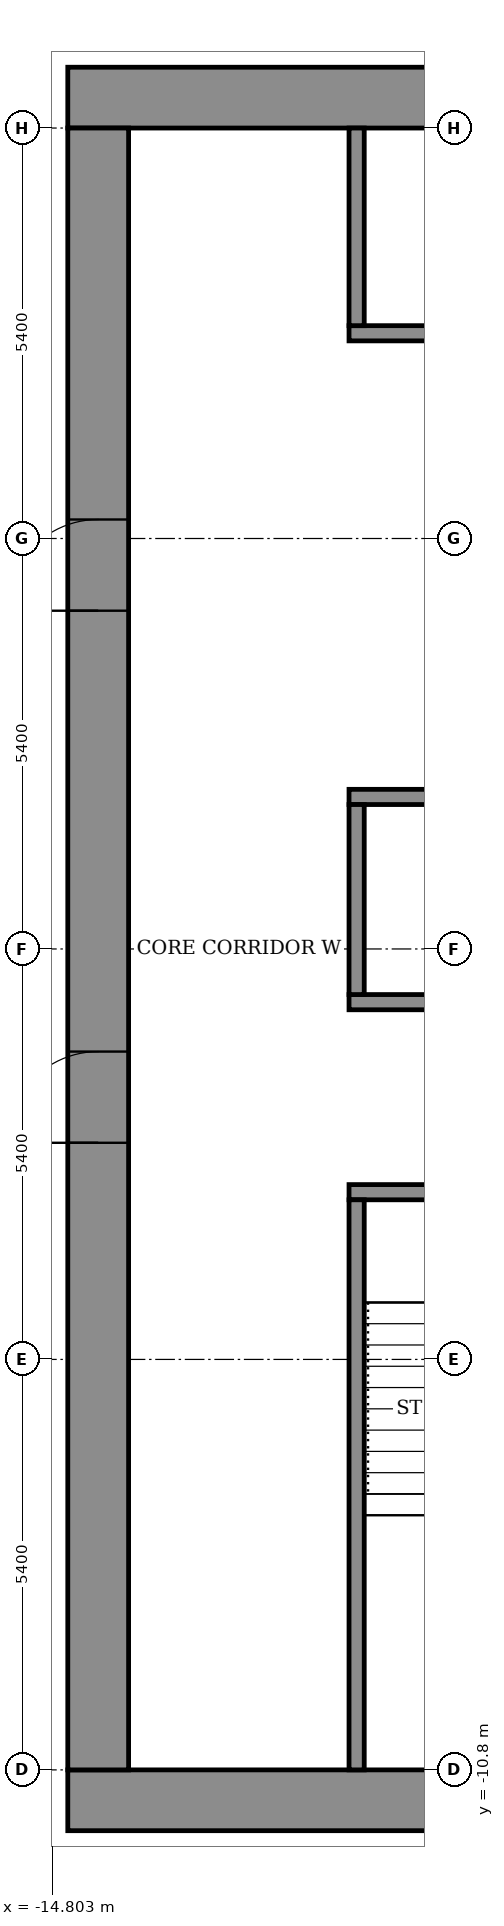
"""IFC4 building model, lengths in metres.
Left out: names, types, materials, properties, quantities, classifications, styles, units other than length and angle.
Written with IfcOpenShell. Run it as: python <this file> out.ifc"""

import sys

from ifc_helpers import new_model, si_unit, direction, frame, frame_2d, origin, place, context, subcontext, project, spatial, rectangle, extrude, element, fill, save


model = new_model("IFC4")
c1 = context("Model", 3, precision=1e-05, world=origin(), true_north=direction((0.0, 1.0)))
c2 = subcontext(c1, "Body", "Model", "MODEL_VIEW")
j1 = project(units=[si_unit("LENGTHUNIT", "METRE"), si_unit("PLANEANGLEUNIT", "RADIAN")], contexts=[c1])
p1 = place(None, origin())
s1 = spatial("IfcSite", under=j1, at=p1, CompositionType="ELEMENT")
p2 = place(p1, origin())
s2 = spatial("IfcBuilding", under=s1, at=p2, CompositionType="ELEMENT")
p3 = place(p2, frame((0.0, 0.0, 208.7)))
s3 = spatial("IfcBuildingStorey", under=s2, at=p3, CompositionType="ELEMENT", Elevation=208.7)
for number, where, z_axis, x_axis in (
    (1, (-14.6, -11.2, 0.0), (0.0, 0.0, 1.0), (1.0, 0.0, 0.0)),
    (2, (-14.6, 11.2, 0.0), (0.0, 0.0, 1.0), (1.0, 0.0, 0.0)),
):
    element("IfcWall", number, at=place(p3, frame(where, z_axis=z_axis, x_axis=x_axis)), inside=s3, PredefinedType="SHEAR", context=c2, shape_type="SweptSolid", body=[
        extrude(rectangle(XDim=29.2, YDim=0.8, at=frame_2d((14.6, 0.0))), origin(), (0.0, 0.0, 1.0), 3.6),
    ])
p4 = place(p3, frame((-14.2, -10.8, 0.0), z_axis=(0.0, 0.0, 1.0), x_axis=(0.0, 1.0, 0.0)))
e3 = element("IfcWall", 3, at=p4, inside=s3, PredefinedType="SHEAR", context=c2, shape_type="SweptSolid", body=[
    extrude(rectangle(XDim=21.6, YDim=0.8, at=frame_2d((10.8, 0.0))), origin(), (0.0, 0.0, 1.0), 3.6),
])
p5 = place(p4, frame((8.25, 0.0, 0.0)))
e4 = element("IfcOpeningElement", 4, at=p5, cuts=e3, PredefinedType="OPENING", context=c2, shape_type="SweptSolid", body=[
    extrude(rectangle(XDim=1.2, YDim=2.1, at=frame_2d((0.6, 1.05))), frame((0.0, 0.41, 0.0), z_axis=(0.0, -1.0, 0.0), x_axis=(1.0, 0.0, 0.0)), (0.0, 0.0, 1.0), 0.82),
])
p6 = place(p4, frame((15.25, 0.0, 0.0)))
e5 = element("IfcOpeningElement", 5, at=p6, cuts=e3, PredefinedType="OPENING", context=c2, shape_type="SweptSolid", body=[
    extrude(rectangle(XDim=1.2, YDim=2.1, at=frame_2d((0.6, 1.05))), frame((0.0, 0.41, 0.0), z_axis=(0.0, -1.0, 0.0), x_axis=(1.0, 0.0, 0.0)), (0.0, 0.0, 1.0), 0.82),
])
p7 = place(p3, frame((-10.9, -3.2, 0.0), z_axis=(0.0, 0.0, 1.0), x_axis=(1.0, 0.0, 0.0)))
e6 = element("IfcWall", 6, at=p7, inside=s3, PredefinedType="SHEAR", context=c2, shape_type="SweptSolid", body=[
    extrude(rectangle(XDim=21.8, YDim=0.2, at=frame_2d((10.9, 0.0))), origin(), (0.0, 0.0, 1.0), 3.05),
])
p8 = place(p7, frame((1.075, 0.0, 0.0)))
e7 = element("IfcOpeningElement", 7, at=p8, cuts=e6, PredefinedType="OPENING", context=c2, shape_type="SweptSolid", body=[
    extrude(rectangle(XDim=1.1, YDim=2.1, at=frame_2d((0.55, 1.05))), frame((0.0, 0.11, 0.0), z_axis=(0.0, -1.0, 0.0), x_axis=(1.0, 0.0, 0.0)), (0.0, 0.0, 1.0), 0.22),
])
p9 = place(p7, frame((10.325, 0.0, 0.0)))
e8 = element("IfcOpeningElement", 8, at=p9, cuts=e6, PredefinedType="OPENING", context=c2, shape_type="SweptSolid", body=[
    extrude(rectangle(XDim=1.1, YDim=2.1, at=frame_2d((0.55, 1.05))), frame((0.0, 0.11, 0.0), z_axis=(0.0, -1.0, 0.0), x_axis=(1.0, 0.0, 0.0)), (0.0, 0.0, 1.0), 0.22),
])
p10 = place(p7, frame((19.625, 0.0, 0.0)))
e9 = element("IfcOpeningElement", 9, at=p10, cuts=e6, PredefinedType="OPENING", context=c2, shape_type="SweptSolid", body=[
    extrude(rectangle(XDim=1.1, YDim=2.1, at=frame_2d((0.55, 1.05))), frame((0.0, 0.11, 0.0), z_axis=(0.0, -1.0, 0.0), x_axis=(1.0, 0.0, 0.0)), (0.0, 0.0, 1.0), 0.22),
])
p11 = place(p7, frame((5.7, 0.0, 0.0)))
e10 = element("IfcOpeningElement", 10, at=p11, cuts=e6, PredefinedType="OPENING", context=c2, shape_type="SweptSolid", body=[
    extrude(rectangle(XDim=1.1, YDim=2.1, at=frame_2d((0.55, 1.05))), frame((0.0, 0.11, 0.0), z_axis=(0.0, -1.0, 0.0), x_axis=(1.0, 0.0, 0.0)), (0.0, 0.0, 1.0), 0.22),
])
p12 = place(p7, frame((14.975, 0.0, 0.0)))
e11 = element("IfcOpeningElement", 11, at=p12, cuts=e6, PredefinedType="OPENING", context=c2, shape_type="SweptSolid", body=[
    extrude(rectangle(XDim=1.1, YDim=2.1, at=frame_2d((0.55, 1.05))), frame((0.0, 0.11, 0.0), z_axis=(0.0, -1.0, 0.0), x_axis=(1.0, 0.0, 0.0)), (0.0, 0.0, 1.0), 0.22),
])
p13 = place(p3, frame((-10.9, -0.7, 0.0), z_axis=(0.0, 0.0, 1.0), x_axis=(1.0, 0.0, 0.0)))
e12 = element("IfcWall", 12, at=p13, inside=s3, PredefinedType="SHEAR", context=c2, shape_type="SweptSolid", body=[
    extrude(rectangle(XDim=21.8, YDim=0.2, at=frame_2d((10.9, 0.0))), origin(), (0.0, 0.0, 1.0), 3.05),
])
p14 = place(p3, frame((-10.9, 2.0, 0.0), z_axis=(0.0, 0.0, 1.0), x_axis=(1.0, 0.0, 0.0)))
e13 = element("IfcWall", 13, at=p14, inside=s3, PredefinedType="SHEAR", context=c2, shape_type="SweptSolid", body=[
    extrude(rectangle(XDim=21.8, YDim=0.2, at=frame_2d((10.9, 0.0))), origin(), (0.0, 0.0, 1.0), 3.05),
])
p15 = place(p14, frame((14.4, 0.0, 0.0)))
e14 = element("IfcOpeningElement", 14, at=p15, cuts=e13, PredefinedType="OPENING", context=c2, shape_type="SweptSolid", body=[
    extrude(rectangle(XDim=1.1, YDim=2.1, at=frame_2d((0.55, 1.05))), frame((0.0, 0.11, 0.0), z_axis=(0.0, -1.0, 0.0), x_axis=(1.0, 0.0, 0.0)), (0.0, 0.0, 1.0), 0.22),
])
p16 = place(p14, frame((17.1, 0.0, 0.0)))
e15 = element("IfcOpeningElement", 15, at=p16, cuts=e13, PredefinedType="OPENING", context=c2, shape_type="SweptSolid", body=[
    extrude(rectangle(XDim=1.1, YDim=2.1, at=frame_2d((0.55, 1.05))), frame((0.0, 0.11, 0.0), z_axis=(0.0, -1.0, 0.0), x_axis=(1.0, 0.0, 0.0)), (0.0, 0.0, 1.0), 0.22),
])
p17 = place(p14, frame((19.8, 0.0, 0.0)))
e16 = element("IfcOpeningElement", 16, at=p17, cuts=e13, PredefinedType="OPENING", context=c2, shape_type="SweptSolid", body=[
    extrude(rectangle(XDim=1.1, YDim=2.1, at=frame_2d((0.55, 1.05))), frame((0.0, 0.11, 0.0), z_axis=(0.0, -1.0, 0.0), x_axis=(1.0, 0.0, 0.0)), (0.0, 0.0, 1.0), 0.22),
])
p18 = place(p14, frame((2.35, 0.0, 0.0)))
e17 = element("IfcOpeningElement", 17, at=p18, cuts=e13, PredefinedType="OPENING", context=c2, shape_type="SweptSolid", body=[
    extrude(rectangle(XDim=0.9, YDim=2.1, at=frame_2d((0.45, 1.05))), frame((0.0, 0.11, 0.0), z_axis=(0.0, -1.0, 0.0), x_axis=(1.0, 0.0, 0.0)), (0.0, 0.0, 1.0), 0.22),
])
p19 = place(p14, frame((9.1, 0.0, 0.0)))
e18 = element("IfcOpeningElement", 18, at=p19, cuts=e13, PredefinedType="OPENING", context=c2, shape_type="SweptSolid", body=[
    extrude(rectangle(XDim=0.9, YDim=2.1, at=frame_2d((0.45, 1.05))), frame((0.0, 0.11, 0.0), z_axis=(0.0, -1.0, 0.0), x_axis=(1.0, 0.0, 0.0)), (0.0, 0.0, 1.0), 0.22),
])
p20 = place(p3, frame((-10.9, 8.1, 0.0), z_axis=(0.0, 0.0, 1.0), x_axis=(1.0, 0.0, 0.0)))
e19 = element("IfcWall", 19, at=p20, inside=s3, PredefinedType="SHEAR", context=c2, shape_type="SweptSolid", body=[
    extrude(rectangle(XDim=21.8, YDim=0.2, at=frame_2d((10.9, 0.0))), origin(), (0.0, 0.0, 1.0), 3.05),
])
p21 = place(p20, frame((14.4, 0.0, 0.0)))
e20 = element("IfcOpeningElement", 20, at=p21, cuts=e19, PredefinedType="OPENING", context=c2, shape_type="SweptSolid", body=[
    extrude(rectangle(XDim=1.1, YDim=2.1, at=frame_2d((0.55, 1.05))), frame((0.0, 0.11, 0.0), z_axis=(0.0, -1.0, 0.0), x_axis=(1.0, 0.0, 0.0)), (0.0, 0.0, 1.0), 0.22),
])
p22 = place(p20, frame((17.1, 0.0, 0.0)))
e21 = element("IfcOpeningElement", 21, at=p22, cuts=e19, PredefinedType="OPENING", context=c2, shape_type="SweptSolid", body=[
    extrude(rectangle(XDim=1.1, YDim=2.1, at=frame_2d((0.55, 1.05))), frame((0.0, 0.11, 0.0), z_axis=(0.0, -1.0, 0.0), x_axis=(1.0, 0.0, 0.0)), (0.0, 0.0, 1.0), 0.22),
])
p23 = place(p20, frame((19.8, 0.0, 0.0)))
e22 = element("IfcOpeningElement", 22, at=p23, cuts=e19, PredefinedType="OPENING", context=c2, shape_type="SweptSolid", body=[
    extrude(rectangle(XDim=1.1, YDim=2.1, at=frame_2d((0.55, 1.05))), frame((0.0, 0.11, 0.0), z_axis=(0.0, -1.0, 0.0), x_axis=(1.0, 0.0, 0.0)), (0.0, 0.0, 1.0), 0.22),
])
p24 = place(p20, frame((2.35, 0.0, 0.0)))
e23 = element("IfcOpeningElement", 23, at=p24, cuts=e19, PredefinedType="OPENING", context=c2, shape_type="SweptSolid", body=[
    extrude(rectangle(XDim=0.9, YDim=2.1, at=frame_2d((0.45, 1.05))), frame((0.0, 0.11, 0.0), z_axis=(0.0, -1.0, 0.0), x_axis=(1.0, 0.0, 0.0)), (0.0, 0.0, 1.0), 0.22),
])
p25 = place(p20, frame((9.1, 0.0, 0.0)))
e24 = element("IfcOpeningElement", 24, at=p25, cuts=e19, PredefinedType="OPENING", context=c2, shape_type="SweptSolid", body=[
    extrude(rectangle(XDim=0.9, YDim=2.1, at=frame_2d((0.45, 1.05))), frame((0.0, 0.11, 0.0), z_axis=(0.0, -1.0, 0.0), x_axis=(1.0, 0.0, 0.0)), (0.0, 0.0, 1.0), 0.22),
])
p26 = place(p3, frame((-10.8, -10.8, 0.0), z_axis=(0.0, 0.0, 1.0), x_axis=(0.0, 1.0, 0.0)))
e25 = element("IfcWall", 25, at=p26, inside=s3, PredefinedType="SHEAR", context=c2, shape_type="SweptSolid", body=[
    extrude(rectangle(XDim=7.5, YDim=0.2, at=frame_2d((3.75, 0.0))), origin(), (0.0, 0.0, 1.0), 3.05),
])
p27 = place(p3, frame((-10.8, -0.6, 0.0), z_axis=(0.0, 0.0, 1.0), x_axis=(0.0, 1.0, 0.0)))
e26 = element("IfcWall", 26, at=p27, inside=s3, PredefinedType="STANDARD", context=c2, shape_type="SweptSolid", body=[
    extrude(rectangle(XDim=2.5, YDim=0.2, at=frame_2d((1.25, 0.0))), origin(), (0.0, 0.0, 1.0), 3.05),
])
p28 = place(p3, frame((-10.8, 8.2, 0.0), z_axis=(0.0, 0.0, 1.0), x_axis=(0.0, 1.0, 0.0)))
e27 = element("IfcWall", 27, at=p28, inside=s3, PredefinedType="STANDARD", context=c2, shape_type="SweptSolid", body=[
    extrude(rectangle(XDim=2.6, YDim=0.2, at=frame_2d((1.3, 0.0))), origin(), (0.0, 0.0, 1.0), 3.05),
])
p29 = place(p5, origin())
e28 = element("IfcDoor", 28, at=p29, inside=s3, OperationType="DOUBLE_DOOR_SINGLE_SWING", PredefinedType="DOOR", context=c2, shape_type="SweptSolid", body=[
    extrude(rectangle(XDim=1.2, YDim=2.1, at=frame_2d((0.6, 1.05))), frame((0.0, 0.025, 0.0), z_axis=(0.0, -1.0, 0.0), x_axis=(1.0, 0.0, 0.0)), (0.0, 0.0, 1.0), 0.05),
])
fill(e4, e28)
p30 = place(p6, origin())
e29 = element("IfcDoor", 29, at=p30, inside=s3, OperationType="DOUBLE_DOOR_SINGLE_SWING", PredefinedType="DOOR", context=c2, shape_type="SweptSolid", body=[
    extrude(rectangle(XDim=1.2, YDim=2.1, at=frame_2d((0.6, 1.05))), frame((0.0, 0.025, 0.0), z_axis=(0.0, -1.0, 0.0), x_axis=(1.0, 0.0, 0.0)), (0.0, 0.0, 1.0), 0.05),
])
fill(e5, e29)
save(model, sys.argv[1])
